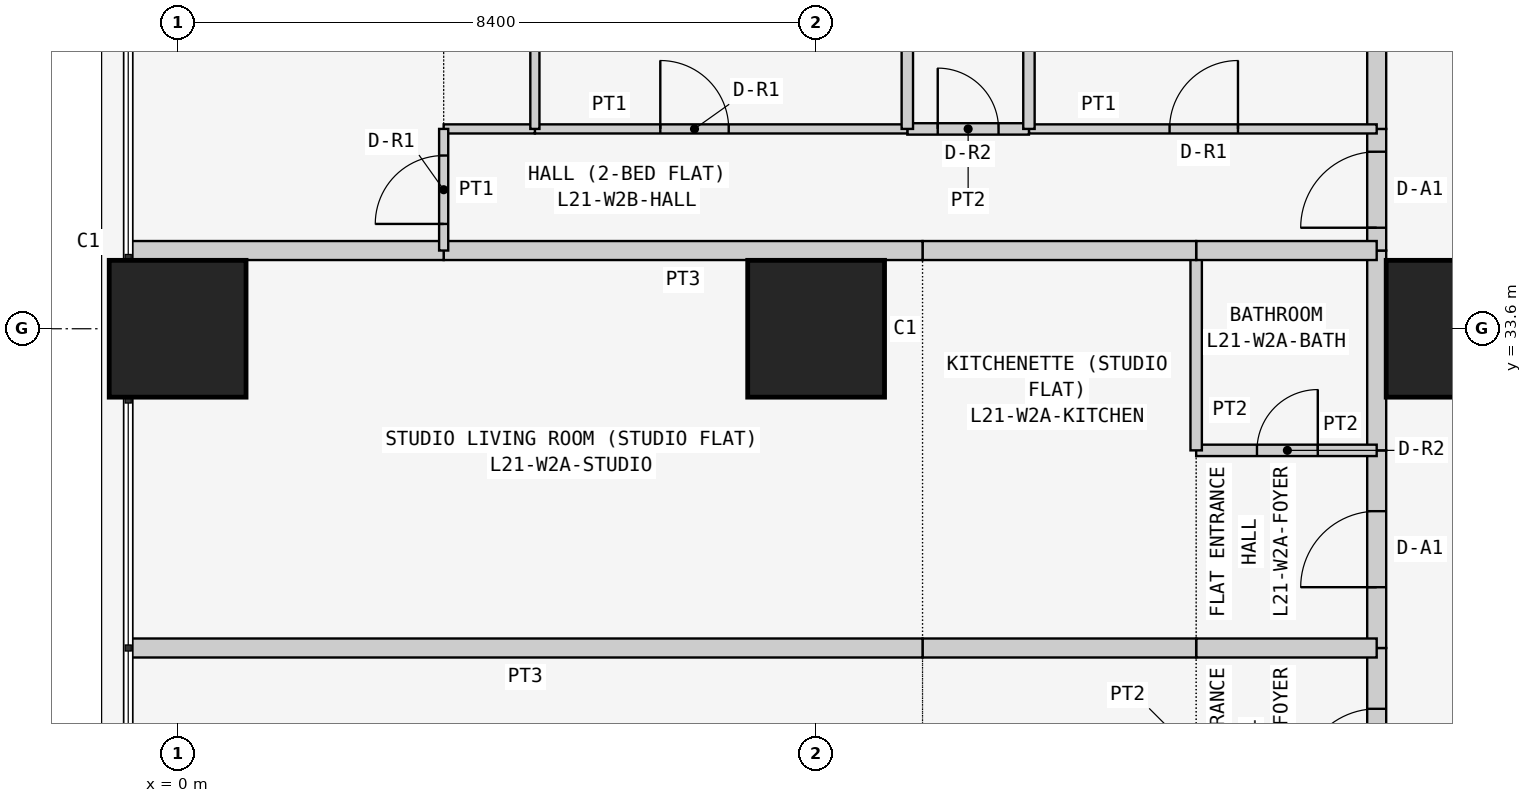
"""IFC4 building model, lengths in metres.
Left out: names, types, materials, properties, quantities, classifications, styles, units other than length and angle.
Written with IfcOpenShell. Run it as: python <this file> out.ifc"""

import sys

from ifc_helpers import new_model, si_unit, direction, frame, frame_2d, origin, origin_2d, place, context, subcontext, project, spatial, rectangle, extrude, element, fill, save


model = new_model("IFC4")
c1 = context("Model", 3, precision=1e-05, world=origin(), true_north=direction((0.0, 1.0)))
c2 = subcontext(c1, "Body", "Model", "MODEL_VIEW")
j1 = project(units=[si_unit("LENGTHUNIT", "METRE"), si_unit("PLANEANGLEUNIT", "RADIAN")], contexts=[c1])
p1 = place(None, origin())
s1 = spatial("IfcSite", under=j1, at=p1, CompositionType="ELEMENT")
p2 = place(p1, origin())
s2 = spatial("IfcBuilding", under=s1, at=p2, CompositionType="ELEMENT")
p3 = place(p2, frame((0.0, 0.0, 84.9)))
s3 = spatial("IfcBuildingStorey", under=s2, at=p3, CompositionType="ELEMENT", Elevation=84.9)
for number, where, z_axis, x_axis in (
    (1, (0.0, 33.6, 0.0), (0.0, 0.0, 1.0), (1.0, 0.0, 0.0)),
    (2, (8.4, 33.6, 0.0), (0.0, 0.0, 1.0), (1.0, 0.0, 0.0)),
    (3, (16.8, 33.6, 0.0), (0.0, 0.0, 1.0), (1.0, 0.0, 0.0)),
):
    element("IfcColumn", number, at=place(p3, frame(where, z_axis=z_axis, x_axis=x_axis)), inside=s3, PredefinedType="COLUMN", context=c2, shape_type="SweptSolid", body=[
        extrude(rectangle(XDim=1.8, YDim=1.8, at=origin_2d()), origin(), (0.0, 0.0, 1.0), 3.6),
    ])
p4 = place(p3, frame((15.775, 26.8, 0.0), z_axis=(0.0, 0.0, 1.0), x_axis=(0.0, 1.0, 0.0)))
e4 = element("IfcWall", 4, at=p4, inside=s3, PredefinedType="PARTITIONING", context=c2, shape_type="SweptSolid", body=[
    extrude(rectangle(XDim=2.6, YDim=0.25, at=frame_2d((1.3, 0.0))), origin(), (0.0, 0.0, 1.0), 3.45),
])
p5 = place(p4, frame((0.8, 0.0, 0.0)))
e5 = element("IfcOpeningElement", 5, at=p5, cuts=e4, PredefinedType="OPENING", context=c2, shape_type="SweptSolid", body=[
    extrude(rectangle(XDim=1.0, YDim=2.1, at=frame_2d((0.5, 1.05))), frame((0.0, 0.135, 0.0), z_axis=(0.0, -1.0, 0.0), x_axis=(1.0, 0.0, 0.0)), (0.0, 0.0, 1.0), 0.27),
])
p6 = place(p3, frame((15.775, 29.4, 0.0), z_axis=(0.0, 0.0, 1.0), x_axis=(0.0, 1.0, 0.0)))
e6 = element("IfcWall", 6, at=p6, inside=s3, PredefinedType="PARTITIONING", context=c2, shape_type="SweptSolid", body=[
    extrude(rectangle(XDim=2.6, YDim=0.25, at=frame_2d((1.3, 0.0))), origin(), (0.0, 0.0, 1.0), 3.45),
])
p7 = place(p6, frame((0.8, 0.0, 0.0)))
e7 = element("IfcOpeningElement", 7, at=p7, cuts=e6, PredefinedType="OPENING", context=c2, shape_type="SweptSolid", body=[
    extrude(rectangle(XDim=1.0, YDim=2.1, at=frame_2d((0.5, 1.05))), frame((0.0, 0.135, 0.0), z_axis=(0.0, -1.0, 0.0), x_axis=(1.0, 0.0, 0.0)), (0.0, 0.0, 1.0), 0.27),
])
p8 = place(p3, frame((15.775, 32.0, 0.0), z_axis=(0.0, 0.0, 1.0), x_axis=(0.0, 1.0, 0.0)))
e8 = element("IfcWall", 8, at=p8, inside=s3, PredefinedType="PARTITIONING", context=c2, shape_type="SweptSolid", body=[
    extrude(rectangle(XDim=2.629, YDim=0.25, at=frame_2d((1.314, 0.0))), origin(), (0.0, 0.0, 1.0), 3.45),
])
p9 = place(p3, frame((15.775, 34.629, 0.0), z_axis=(0.0, 0.0, 1.0), x_axis=(0.0, 1.0, 0.0)))
e9 = element("IfcWall", 9, at=p9, inside=s3, PredefinedType="PARTITIONING", context=c2, shape_type="SweptSolid", body=[
    extrude(rectangle(XDim=1.6, YDim=0.25, at=frame_2d((0.8, 0.0))), origin(), (0.0, 0.0, 1.0), 3.45),
])
p10 = place(p9, frame((0.3, 0.0, 0.0)))
e10 = element("IfcOpeningElement", 10, at=p10, cuts=e9, PredefinedType="OPENING", context=c2, shape_type="SweptSolid", body=[
    extrude(rectangle(XDim=1.0, YDim=2.1, at=frame_2d((0.5, 1.05))), frame((0.0, 0.135, 0.0), z_axis=(0.0, -1.0, 0.0), x_axis=(1.0, 0.0, 0.0)), (0.0, 0.0, 1.0), 0.27),
])
p11 = place(p3, frame((15.775, 36.229, 0.0), z_axis=(0.0, 0.0, 1.0), x_axis=(0.0, 1.0, 0.0)))
e11 = element("IfcWall", 11, at=p11, inside=s3, PredefinedType="PARTITIONING", context=c2, shape_type="SweptSolid", body=[
    extrude(rectangle(XDim=6.471, YDim=0.25, at=frame_2d((3.235, 0.0))), origin(), (0.0, 0.0, 1.0), 3.45),
])
p12 = place(p3, frame((15.775, 29.4, 0.0), z_axis=(0.0, 0.0, 1.0), x_axis=(-1.0, 0.0, 0.0)))
e12 = element("IfcWall", 12, at=p12, inside=s3, PredefinedType="PARTITIONING", context=c2, shape_type="SweptSolid", body=[
    extrude(rectangle(XDim=2.375, YDim=0.25, at=frame_2d((1.188, 0.0))), origin(), (0.0, 0.0, 1.0), 3.45),
])
p13 = place(p3, frame((13.4, 29.4, 0.0), z_axis=(0.0, 0.0, 1.0), x_axis=(-1.0, 0.0, 0.0)))
e13 = element("IfcWall", 13, at=p13, inside=s3, PredefinedType="PARTITIONING", context=c2, shape_type="SweptSolid", body=[
    extrude(rectangle(XDim=3.6, YDim=0.25, at=frame_2d((1.8, 0.0))), origin(), (0.0, 0.0, 1.0), 3.45),
])
p14 = place(p3, frame((9.8, 29.4, 0.0), z_axis=(0.0, 0.0, 1.0), x_axis=(-1.0, 0.0, 0.0)))
e14 = element("IfcWall", 14, at=p14, inside=s3, PredefinedType="PARTITIONING", context=c2, shape_type="SweptSolid", body=[
    extrude(rectangle(XDim=10.45, YDim=0.25, at=frame_2d((5.225, 0.0))), origin(), (0.0, 0.0, 1.0), 3.45),
])
p15 = place(p3, frame((13.4, 32.0, 0.0), z_axis=(0.0, 0.0, 1.0), x_axis=(1.0, 0.0, 0.0)))
e15 = element("IfcWall", 15, at=p15, inside=s3, PredefinedType="PARTITIONING", context=c2, shape_type="SweptSolid", body=[
    extrude(rectangle(XDim=2.375, YDim=0.15, at=frame_2d((1.188, 0.0))), origin(), (0.0, 0.0, 1.0), 3.45),
])
p16 = place(p15, frame((0.8, 0.0, 0.0)))
e16 = element("IfcOpeningElement", 16, at=p16, cuts=e15, PredefinedType="OPENING", context=c2, shape_type="SweptSolid", body=[
    extrude(rectangle(XDim=0.8, YDim=2.1, at=frame_2d((0.4, 1.05))), frame((0.0, 0.085, 0.0), z_axis=(0.0, -1.0, 0.0), x_axis=(1.0, 0.0, 0.0)), (0.0, 0.0, 1.0), 0.17),
])
p17 = place(p3, frame((13.4, 32.0, 0.0), z_axis=(0.0, 0.0, 1.0), x_axis=(0.0, 1.0, 0.0)))
e17 = element("IfcWall", 17, at=p17, inside=s3, PredefinedType="PARTITIONING", context=c2, shape_type="SweptSolid", body=[
    extrude(rectangle(XDim=2.629, YDim=0.15, at=frame_2d((1.314, 0.0))), origin(), (0.0, 0.0, 1.0), 3.45),
])
p18 = place(p3, frame((13.4, 34.629, 0.0), z_axis=(0.0, 0.0, 1.0), x_axis=(1.0, 0.0, 0.0)))
e18 = element("IfcWall", 18, at=p18, inside=s3, PredefinedType="PARTITIONING", context=c2, shape_type="SweptSolid", body=[
    extrude(rectangle(XDim=2.375, YDim=0.25, at=frame_2d((1.188, 0.0))), origin(), (0.0, 0.0, 1.0), 3.45),
])
p19 = place(p3, frame((9.8, 34.629, 0.0), z_axis=(0.0, 0.0, 1.0), x_axis=(1.0, 0.0, 0.0)))
e19 = element("IfcWall", 19, at=p19, inside=s3, PredefinedType="PARTITIONING", context=c2, shape_type="SweptSolid", body=[
    extrude(rectangle(XDim=3.6, YDim=0.25, at=frame_2d((1.8, 0.0))), origin(), (0.0, 0.0, 1.0), 3.45),
])
p20 = place(p3, frame((3.5, 34.629, 0.0), z_axis=(0.0, 0.0, 1.0), x_axis=(1.0, 0.0, 0.0)))
e20 = element("IfcWall", 20, at=p20, inside=s3, PredefinedType="PARTITIONING", context=c2, shape_type="SweptSolid", body=[
    extrude(rectangle(XDim=6.3, YDim=0.25, at=frame_2d((3.15, 0.0))), origin(), (0.0, 0.0, 1.0), 3.45),
])
p21 = place(p3, frame((-0.65, 34.629, 0.0), z_axis=(0.0, 0.0, 1.0), x_axis=(1.0, 0.0, 0.0)))
e21 = element("IfcWall", 21, at=p21, inside=s3, PredefinedType="PARTITIONING", context=c2, shape_type="SweptSolid", body=[
    extrude(rectangle(XDim=4.15, YDim=0.25, at=frame_2d((2.075, 0.0))), origin(), (0.0, 0.0, 1.0), 3.45),
])
p22 = place(p3, frame((11.2, 36.229, 0.0), z_axis=(0.0, 0.0, 1.0), x_axis=(1.0, 0.0, 0.0)))
e22 = element("IfcWall", 22, at=p22, inside=s3, PredefinedType="PARTITIONING", context=c2, shape_type="SweptSolid", body=[
    extrude(rectangle(XDim=4.575, YDim=0.12, at=frame_2d((2.288, 0.0))), origin(), (0.0, 0.0, 1.0), 3.45),
])
p23 = place(p22, frame((1.85, 0.0, 0.0)))
e23 = element("IfcOpeningElement", 23, at=p23, cuts=e22, PredefinedType="OPENING", context=c2, shape_type="SweptSolid", body=[
    extrude(rectangle(XDim=0.9, YDim=2.1, at=frame_2d((0.45, 1.05))), frame((0.0, 0.07, 0.0), z_axis=(0.0, -1.0, 0.0), x_axis=(1.0, 0.0, 0.0)), (0.0, 0.0, 1.0), 0.14),
])
p24 = place(p3, frame((9.6, 36.229, 0.0), z_axis=(0.0, 0.0, 1.0), x_axis=(1.0, 0.0, 0.0)))
e24 = element("IfcWall", 24, at=p24, inside=s3, PredefinedType="PARTITIONING", context=c2, shape_type="SweptSolid", body=[
    extrude(rectangle(XDim=1.6, YDim=0.15, at=frame_2d((0.8, 0.0))), origin(), (0.0, 0.0, 1.0), 3.45),
])
p25 = place(p24, frame((0.4, 0.0, 0.0)))
e25 = element("IfcOpeningElement", 25, at=p25, cuts=e24, PredefinedType="OPENING", context=c2, shape_type="SweptSolid", body=[
    extrude(rectangle(XDim=0.8, YDim=2.1, at=frame_2d((0.4, 1.05))), frame((0.0, 0.085, 0.0), z_axis=(0.0, -1.0, 0.0), x_axis=(1.0, 0.0, 0.0)), (0.0, 0.0, 1.0), 0.17),
])
p26 = place(p3, frame((4.7, 36.229, 0.0), z_axis=(0.0, 0.0, 1.0), x_axis=(1.0, 0.0, 0.0)))
e26 = element("IfcWall", 26, at=p26, inside=s3, PredefinedType="PARTITIONING", context=c2, shape_type="SweptSolid", body=[
    extrude(rectangle(XDim=4.9, YDim=0.12, at=frame_2d((2.45, 0.0))), origin(), (0.0, 0.0, 1.0), 3.45),
])
p27 = place(p26, frame((1.65, 0.0, 0.0)))
e27 = element("IfcOpeningElement", 27, at=p27, cuts=e26, PredefinedType="OPENING", context=c2, shape_type="SweptSolid", body=[
    extrude(rectangle(XDim=0.9, YDim=2.1, at=frame_2d((0.45, 1.05))), frame((0.0, 0.07, 0.0), z_axis=(0.0, -1.0, 0.0), x_axis=(1.0, 0.0, 0.0)), (0.0, 0.0, 1.0), 0.14),
])
p28 = place(p3, frame((3.5, 36.229, 0.0), z_axis=(0.0, 0.0, 1.0), x_axis=(1.0, 0.0, 0.0)))
e28 = element("IfcWall", 28, at=p28, inside=s3, PredefinedType="PARTITIONING", context=c2, shape_type="SweptSolid", body=[
    extrude(rectangle(XDim=1.2, YDim=0.12, at=frame_2d((0.6, 0.0))), origin(), (0.0, 0.0, 1.0), 3.45),
])
p29 = place(p3, frame((3.5, 34.629, 0.0), z_axis=(0.0, 0.0, 1.0), x_axis=(0.0, 1.0, 0.0)))
e29 = element("IfcWall", 29, at=p29, inside=s3, PredefinedType="PARTITIONING", context=c2, shape_type="SweptSolid", body=[
    extrude(rectangle(XDim=1.6, YDim=0.12, at=frame_2d((0.8, 0.0))), origin(), (0.0, 0.0, 1.0), 3.45),
])
p30 = place(p29, frame((0.35, 0.0, 0.0)))
e30 = element("IfcOpeningElement", 30, at=p30, cuts=e29, PredefinedType="OPENING", context=c2, shape_type="SweptSolid", body=[
    extrude(rectangle(XDim=0.9, YDim=2.1, at=frame_2d((0.45, 1.05))), frame((0.0, 0.07, 0.0), z_axis=(0.0, -1.0, 0.0), x_axis=(1.0, 0.0, 0.0)), (0.0, 0.0, 1.0), 0.14),
])
for number, where, z_axis, x_axis in (
    (31, (11.2, 36.229, 0.0), (0.0, 0.0, 1.0), (0.0, 1.0, 0.0)),
    (32, (9.6, 36.229, 0.0), (0.0, 0.0, 1.0), (0.0, 1.0, 0.0)),
):
    element("IfcWall", number, at=place(p3, frame(where, z_axis=z_axis, x_axis=x_axis)), inside=s3, PredefinedType="PARTITIONING", context=c2, shape_type="SweptSolid", body=[
        extrude(rectangle(XDim=6.471, YDim=0.15, at=frame_2d((3.235, 0.0))), origin(), (0.0, 0.0, 1.0), 3.45),
    ])
p31 = place(p3, frame((4.7, 36.229, 0.0), z_axis=(0.0, 0.0, 1.0), x_axis=(0.0, 1.0, 0.0)))
e33 = element("IfcWall", 33, at=p31, inside=s3, PredefinedType="PARTITIONING", context=c2, shape_type="SweptSolid", body=[
    extrude(rectangle(XDim=6.471, YDim=0.12, at=frame_2d((3.235, 0.0))), origin(), (0.0, 0.0, 1.0), 3.45),
])
p32 = place(p5, origin())
e34 = element("IfcDoor", 34, at=p32, inside=s3, OperationType="SINGLE_SWING_LEFT", PredefinedType="DOOR", context=c2, shape_type="SweptSolid", body=[
    extrude(rectangle(XDim=1.0, YDim=2.1, at=frame_2d((0.5, 1.05))), frame((0.0, 0.025, 0.0), z_axis=(0.0, -1.0, 0.0), x_axis=(1.0, 0.0, 0.0)), (0.0, 0.0, 1.0), 0.05),
])
fill(e5, e34)
p33 = place(p7, origin())
e35 = element("IfcDoor", 35, at=p33, inside=s3, OperationType="SINGLE_SWING_LEFT", PredefinedType="DOOR", context=c2, shape_type="SweptSolid", body=[
    extrude(rectangle(XDim=1.0, YDim=2.1, at=frame_2d((0.5, 1.05))), frame((0.0, 0.025, 0.0), z_axis=(0.0, -1.0, 0.0), x_axis=(1.0, 0.0, 0.0)), (0.0, 0.0, 1.0), 0.05),
])
fill(e7, e35)
p34 = place(p16, origin())
e36 = element("IfcDoor", 36, at=p34, inside=s3, OperationType="SINGLE_SWING_RIGHT", PredefinedType="DOOR", context=c2, shape_type="SweptSolid", body=[
    extrude(rectangle(XDim=0.8, YDim=2.1, at=frame_2d((0.4, 1.05))), frame((0.0, 0.025, 0.0), z_axis=(0.0, -1.0, 0.0), x_axis=(1.0, 0.0, 0.0)), (0.0, 0.0, 1.0), 0.05),
])
fill(e16, e36)
p35 = place(p10, origin())
e37 = element("IfcDoor", 37, at=p35, inside=s3, OperationType="SINGLE_SWING_LEFT", PredefinedType="DOOR", context=c2, shape_type="SweptSolid", body=[
    extrude(rectangle(XDim=1.0, YDim=2.1, at=frame_2d((0.5, 1.05))), frame((0.0, 0.025, 0.0), z_axis=(0.0, -1.0, 0.0), x_axis=(1.0, 0.0, 0.0)), (0.0, 0.0, 1.0), 0.05),
])
fill(e10, e37)
p36 = place(p23, origin())
e38 = element("IfcDoor", 38, at=p36, inside=s3, OperationType="SINGLE_SWING_RIGHT", PredefinedType="DOOR", context=c2, shape_type="SweptSolid", body=[
    extrude(rectangle(XDim=0.9, YDim=2.1, at=frame_2d((0.45, 1.05))), frame((0.0, 0.025, 0.0), z_axis=(0.0, -1.0, 0.0), x_axis=(1.0, 0.0, 0.0)), (0.0, 0.0, 1.0), 0.05),
])
fill(e23, e38)
p37 = place(p25, origin())
e39 = element("IfcDoor", 39, at=p37, inside=s3, OperationType="SINGLE_SWING_LEFT", PredefinedType="DOOR", context=c2, shape_type="SweptSolid", body=[
    extrude(rectangle(XDim=0.8, YDim=2.1, at=frame_2d((0.4, 1.05))), frame((0.0, 0.025, 0.0), z_axis=(0.0, -1.0, 0.0), x_axis=(1.0, 0.0, 0.0)), (0.0, 0.0, 1.0), 0.05),
])
fill(e25, e39)
p38 = place(p27, origin())
e40 = element("IfcDoor", 40, at=p38, inside=s3, OperationType="SINGLE_SWING_LEFT", PredefinedType="DOOR", context=c2, shape_type="SweptSolid", body=[
    extrude(rectangle(XDim=0.9, YDim=2.1, at=frame_2d((0.45, 1.05))), frame((0.0, 0.025, 0.0), z_axis=(0.0, -1.0, 0.0), x_axis=(1.0, 0.0, 0.0)), (0.0, 0.0, 1.0), 0.05),
])
fill(e27, e40)
p39 = place(p30, origin())
e41 = element("IfcDoor", 41, at=p39, inside=s3, OperationType="SINGLE_SWING_LEFT", PredefinedType="DOOR", context=c2, shape_type="SweptSolid", body=[
    extrude(rectangle(XDim=0.9, YDim=2.1, at=frame_2d((0.45, 1.05))), frame((0.0, 0.025, 0.0), z_axis=(0.0, -1.0, 0.0), x_axis=(1.0, 0.0, 0.0)), (0.0, 0.0, 1.0), 0.05),
])
fill(e30, e41)
save(model, sys.argv[1])
